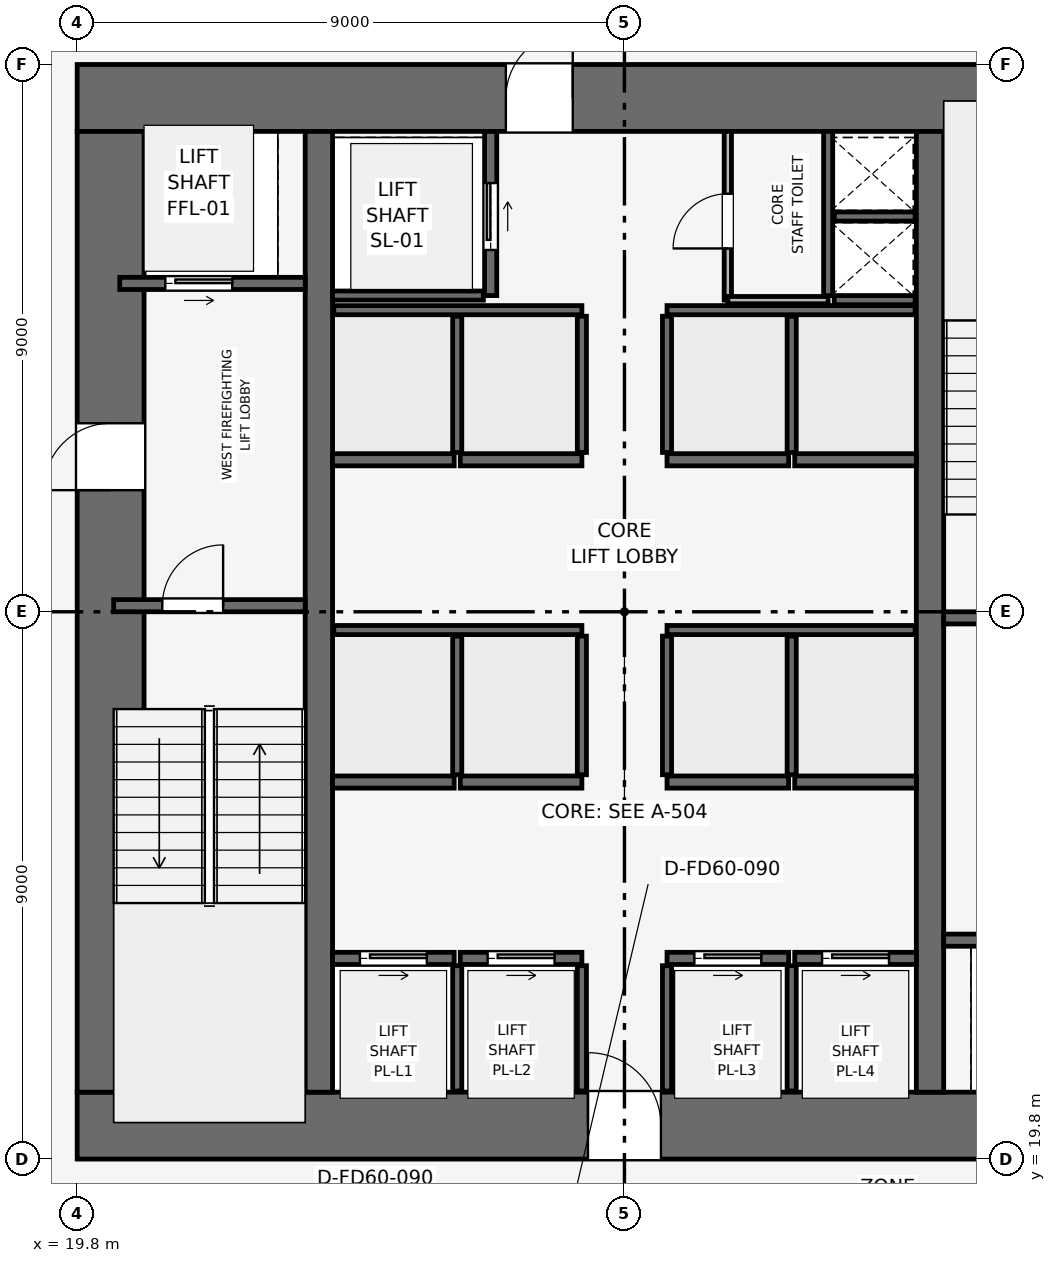
"""IFC4 building model, lengths in metres.
Left out: names, types, materials, properties, quantities, classifications, styles, units other than length and angle.
Written with IfcOpenShell. Run it as: python <this file> out.ifc"""

import sys

from ifc_helpers import new_model, si_unit, direction, frame, frame_2d, origin, place, context, subcontext, project, spatial, rectangle, extrude, element, fill, save


model = new_model("IFC4")
c1 = context("Model", 3, precision=1e-05, world=origin(), true_north=direction((0.0, 1.0)))
c2 = subcontext(c1, "Body", "Model", "MODEL_VIEW")
j1 = project(units=[si_unit("LENGTHUNIT", "METRE"), si_unit("PLANEANGLEUNIT", "RADIAN")], contexts=[c1])
p1 = place(None, origin())
s1 = spatial("IfcSite", under=j1, at=p1, CompositionType="ELEMENT")
p2 = place(p1, origin())
s2 = spatial("IfcBuilding", under=s1, at=p2, CompositionType="ELEMENT")
p3 = place(p2, frame((0.0, 0.0, 53.4)))
s3 = spatial("IfcBuildingStorey", under=s2, at=p3, CompositionType="ELEMENT", Elevation=53.4)
p4 = place(p3, frame((19.8, 20.35, 0.0), z_axis=(0.0, 0.0, 1.0), x_axis=(1.0, 0.0, 0.0)))
e1 = element("IfcWall", 1, at=p4, inside=s3, PredefinedType="SHEAR", context=c2, shape_type="SweptSolid", body=[
    extrude(rectangle(XDim=18.0, YDim=1.1, at=frame_2d((9.0, 0.0))), origin(), (0.0, 0.0, 1.0), 3.9),
])
p5 = place(p4, frame((8.4, 0.0, 0.0)))
e2 = element("IfcOpeningElement", 2, at=p5, cuts=e1, PredefinedType="OPENING", context=c2, shape_type="SweptSolid", body=[
    extrude(rectangle(XDim=1.2, YDim=2.2, at=frame_2d((0.6, 1.1))), frame((0.0, 0.56, 0.0), z_axis=(0.0, -1.0, 0.0), x_axis=(1.0, 0.0, 0.0)), (0.0, 0.0, 1.0), 1.12),
])
p6 = place(p3, frame((19.8, 37.25, 0.0), z_axis=(0.0, 0.0, 1.0), x_axis=(1.0, 0.0, 0.0)))
e3 = element("IfcWall", 3, at=p6, inside=s3, PredefinedType="SHEAR", context=c2, shape_type="SweptSolid", body=[
    extrude(rectangle(XDim=18.0, YDim=1.1, at=frame_2d((9.0, 0.0))), origin(), (0.0, 0.0, 1.0), 3.9),
])
p7 = place(p6, frame((7.05, 0.0, 0.0)))
e4 = element("IfcOpeningElement", 4, at=p7, cuts=e3, PredefinedType="OPENING", context=c2, shape_type="SweptSolid", body=[
    extrude(rectangle(XDim=1.1, YDim=2.15, at=frame_2d((0.55, 1.075))), frame((0.0, 0.56, 0.0), z_axis=(0.0, -1.0, 0.0), x_axis=(1.0, 0.0, 0.0)), (0.0, 0.0, 1.0), 1.12),
])
p8 = place(p3, frame((20.35, 20.9, 0.0), z_axis=(0.0, 0.0, 1.0), x_axis=(0.0, 1.0, 0.0)))
e5 = element("IfcWall", 5, at=p8, inside=s3, PredefinedType="SHEAR", context=c2, shape_type="SweptSolid", body=[
    extrude(rectangle(XDim=15.8, YDim=1.1, at=frame_2d((7.9, 0.0))), origin(), (0.0, 0.0, 1.0), 3.9),
])
p9 = place(p8, frame((9.9, 0.0, 0.0)))
e6 = element("IfcOpeningElement", 6, at=p9, cuts=e5, PredefinedType="OPENING", context=c2, shape_type="SweptSolid", body=[
    extrude(rectangle(XDim=1.1, YDim=2.15, at=frame_2d((0.55, 1.075))), frame((0.0, 0.56, 0.0), z_axis=(0.0, -1.0, 0.0), x_axis=(1.0, 0.0, 0.0)), (0.0, 0.0, 1.0), 1.12),
])
for number, where, z_axis, x_axis in (
    (7, (23.775, 20.9, 0.0), (0.0, 0.0, 1.0), (0.0, 1.0, 0.0)),
    (8, (33.825, 20.9, 0.0), (0.0, 0.0, 1.0), (0.0, 1.0, 0.0)),
):
    element("IfcWall", number, at=place(p3, frame(where, z_axis=z_axis, x_axis=x_axis)), inside=s3, PredefinedType="SHEAR", context=c2, shape_type="SweptSolid", body=[
        extrude(rectangle(XDim=15.8, YDim=0.45, at=frame_2d((7.9, 0.0))), origin(), (0.0, 0.0, 1.0), 3.9),
    ])
p10 = place(p3, frame((20.4, 28.9, 0.0), z_axis=(0.0, 0.0, 1.0), x_axis=(1.0, 0.0, 0.0)))
e9 = element("IfcWall", 9, at=p10, inside=s3, PredefinedType="SHEAR", context=c2, shape_type="SweptSolid", body=[
    extrude(rectangle(XDim=3.15, YDim=0.2, at=frame_2d((1.575, 0.0))), origin(), (0.0, 0.0, 1.0), 3.65),
])
p11 = place(p10, frame((0.8, 0.0, 0.0)))
e10 = element("IfcOpeningElement", 10, at=p11, cuts=e9, PredefinedType="OPENING", context=c2, shape_type="SweptSolid", body=[
    extrude(rectangle(XDim=1.0, YDim=2.1, at=frame_2d((0.5, 1.05))), frame((0.0, 0.11, 0.0), z_axis=(0.0, -1.0, 0.0), x_axis=(1.0, 0.0, 0.0)), (0.0, 0.0, 1.0), 0.22),
])
p12 = place(p3, frame((34.05, 28.7, 0.0), z_axis=(0.0, 0.0, 1.0), x_axis=(1.0, 0.0, 0.0)))
e11 = element("IfcWall", 11, at=p12, inside=s3, PredefinedType="SHEAR", context=c2, shape_type="SweptSolid", body=[
    extrude(rectangle(XDim=3.15, YDim=0.2, at=frame_2d((1.575, 0.0))), origin(), (0.0, 0.0, 1.0), 3.65),
])
p13 = place(p12, frame((0.8, 0.0, 0.0)))
e12 = element("IfcOpeningElement", 12, at=p13, cuts=e11, PredefinedType="OPENING", context=c2, shape_type="SweptSolid", body=[
    extrude(rectangle(XDim=1.0, YDim=2.1, at=frame_2d((0.5, 1.05))), frame((0.0, 0.11, 0.0), z_axis=(0.0, -1.0, 0.0), x_axis=(1.0, 0.0, 0.0)), (0.0, 0.0, 1.0), 0.22),
])
p14 = place(p3, frame((32.15, 34.0, 0.0), z_axis=(0.0, 0.0, 1.0), x_axis=(0.0, 1.0, 0.0)))
e13 = element("IfcWall", 13, at=p14, inside=s3, PredefinedType="SHEAR", context=c2, shape_type="SweptSolid", body=[
    extrude(rectangle(XDim=2.7, YDim=0.15, at=frame_2d((1.35, 0.0))), origin(), (0.0, 0.0, 1.0), 3.65),
])
for number, where, z_axis, x_axis in (
    (14, (32.25, 33.925, 0.0), (0.0, 0.0, 1.0), (1.0, 0.0, 0.0)),
    (15, (32.25, 35.3, 0.0), (0.0, 0.0, 1.0), (1.0, 0.0, 0.0)),
):
    element("IfcWall", number, at=place(p3, frame(where, z_axis=z_axis, x_axis=x_axis)), inside=s3, PredefinedType="SHEAR", context=c2, shape_type="SweptSolid", body=[
        extrude(rectangle(XDim=1.33, YDim=0.15, at=frame_2d((0.665, 0.0))), origin(), (0.0, 0.0, 1.0), 3.65),
    ])
p15 = place(p3, frame((20.5, 34.2, 0.0), z_axis=(0.0, 0.0, 1.0), x_axis=(1.0, 0.0, 0.0)))
e16 = element("IfcWall", 16, at=p15, inside=s3, PredefinedType="SHEAR", context=c2, shape_type="SweptSolid", body=[
    extrude(rectangle(XDim=3.05, YDim=0.2, at=frame_2d((1.525, 0.0))), origin(), (0.0, 0.0, 1.0), 3.65),
])
p16 = place(p15, frame((0.75, 0.0, 0.0)))
e17 = element("IfcOpeningElement", 17, at=p16, cuts=e16, PredefinedType="OPENING", context=c2, shape_type="SweptSolid", body=[
    extrude(rectangle(XDim=1.1, YDim=2.15, at=frame_2d((0.55, 1.075))), frame((0.0, 0.11, 0.0), z_axis=(0.0, -1.0, 0.0), x_axis=(1.0, 0.0, 0.0)), (0.0, 0.0, 1.0), 0.22),
])
p17 = place(p3, frame((34.05, 23.4, 0.0), z_axis=(0.0, 0.0, 1.0), x_axis=(1.0, 0.0, 0.0)))
e18 = element("IfcWall", 18, at=p17, inside=s3, PredefinedType="SHEAR", context=c2, shape_type="SweptSolid", body=[
    extrude(rectangle(XDim=3.05, YDim=0.2, at=frame_2d((1.525, 0.0))), origin(), (0.0, 0.0, 1.0), 3.65),
])
p18 = place(p17, frame((1.2, 0.0, 0.0)))
e19 = element("IfcOpeningElement", 19, at=p18, cuts=e18, PredefinedType="OPENING", context=c2, shape_type="SweptSolid", body=[
    extrude(rectangle(XDim=1.1, YDim=2.15, at=frame_2d((0.55, 1.075))), frame((0.0, 0.11, 0.0), z_axis=(0.0, -1.0, 0.0), x_axis=(1.0, 0.0, 0.0)), (0.0, 0.0, 1.0), 0.22),
])
p19 = place(p3, frame((26.6, 34.0, 0.0), z_axis=(0.0, 0.0, 1.0), x_axis=(0.0, 1.0, 0.0)))
e20 = element("IfcWall", 20, at=p19, inside=s3, PredefinedType="SHEAR", context=c2, shape_type="SweptSolid", body=[
    extrude(rectangle(XDim=2.7, YDim=0.2, at=frame_2d((1.35, 0.0))), origin(), (0.0, 0.0, 1.0), 3.65),
])
p20 = place(p19, frame((0.75, 0.0, 0.0)))
e21 = element("IfcOpeningElement", 21, at=p20, cuts=e20, PredefinedType="OPENING", context=c2, shape_type="SweptSolid", body=[
    extrude(rectangle(XDim=1.1, YDim=2.15, at=frame_2d((0.55, 1.075))), frame((0.0, 0.11, 0.0), z_axis=(0.0, -1.0, 0.0), x_axis=(1.0, 0.0, 0.0)), (0.0, 0.0, 1.0), 0.22),
])
p21 = place(p3, frame((24.0, 34.0, 0.0), z_axis=(0.0, 0.0, 1.0), x_axis=(1.0, 0.0, 0.0)))
e22 = element("IfcWall", 22, at=p21, inside=s3, PredefinedType="SHEAR", context=c2, shape_type="SweptSolid", body=[
    extrude(rectangle(XDim=2.48, YDim=0.15, at=frame_2d((1.24, 0.0))), origin(), (0.0, 0.0, 1.0), 3.65),
])
p22 = place(p3, frame((24.0, 23.1, 0.0), z_axis=(0.0, 0.0, 1.0), x_axis=(1.0, 0.0, 0.0)))
e23 = element("IfcWall", 23, at=p22, inside=s3, PredefinedType="SHEAR", context=c2, shape_type="SweptSolid", body=[
    extrude(rectangle(XDim=2.0, YDim=0.2, at=frame_2d((1.0, 0.0))), origin(), (0.0, 0.0, 1.0), 3.65),
])
p23 = place(p22, frame((0.45, 0.0, 0.0)))
e24 = element("IfcOpeningElement", 24, at=p23, cuts=e23, PredefinedType="OPENING", context=c2, shape_type="SweptSolid", body=[
    extrude(rectangle(XDim=1.1, YDim=2.15, at=frame_2d((0.55, 1.075))), frame((0.0, 0.11, 0.0), z_axis=(0.0, -1.0, 0.0), x_axis=(1.0, 0.0, 0.0)), (0.0, 0.0, 1.0), 0.22),
])
p24 = place(p3, frame((26.1, 23.1, 0.0), z_axis=(0.0, 0.0, 1.0), x_axis=(1.0, 0.0, 0.0)))
e25 = element("IfcWall", 25, at=p24, inside=s3, PredefinedType="SHEAR", context=c2, shape_type="SweptSolid", body=[
    extrude(rectangle(XDim=2.0, YDim=0.2, at=frame_2d((1.0, 0.0))), origin(), (0.0, 0.0, 1.0), 3.65),
])
p25 = place(p24, frame((0.45, 0.0, 0.0)))
e26 = element("IfcOpeningElement", 26, at=p25, cuts=e25, PredefinedType="OPENING", context=c2, shape_type="SweptSolid", body=[
    extrude(rectangle(XDim=1.1, YDim=2.15, at=frame_2d((0.55, 1.075))), frame((0.0, 0.11, 0.0), z_axis=(0.0, -1.0, 0.0), x_axis=(1.0, 0.0, 0.0)), (0.0, 0.0, 1.0), 0.22),
])
p26 = place(p3, frame((29.5, 23.1, 0.0), z_axis=(0.0, 0.0, 1.0), x_axis=(1.0, 0.0, 0.0)))
e27 = element("IfcWall", 27, at=p26, inside=s3, PredefinedType="SHEAR", context=c2, shape_type="SweptSolid", body=[
    extrude(rectangle(XDim=2.0, YDim=0.2, at=frame_2d((1.0, 0.0))), origin(), (0.0, 0.0, 1.0), 3.65),
])
p27 = place(p26, frame((0.45, 0.0, 0.0)))
e28 = element("IfcOpeningElement", 28, at=p27, cuts=e27, PredefinedType="OPENING", context=c2, shape_type="SweptSolid", body=[
    extrude(rectangle(XDim=1.1, YDim=2.15, at=frame_2d((0.55, 1.075))), frame((0.0, 0.11, 0.0), z_axis=(0.0, -1.0, 0.0), x_axis=(1.0, 0.0, 0.0)), (0.0, 0.0, 1.0), 0.22),
])
p28 = place(p3, frame((31.6, 23.1, 0.0), z_axis=(0.0, 0.0, 1.0), x_axis=(1.0, 0.0, 0.0)))
e29 = element("IfcWall", 29, at=p28, inside=s3, PredefinedType="SHEAR", context=c2, shape_type="SweptSolid", body=[
    extrude(rectangle(XDim=2.0, YDim=0.2, at=frame_2d((1.0, 0.0))), origin(), (0.0, 0.0, 1.0), 3.65),
])
p29 = place(p28, frame((0.45, 0.0, 0.0)))
e30 = element("IfcOpeningElement", 30, at=p29, cuts=e29, PredefinedType="OPENING", context=c2, shape_type="SweptSolid", body=[
    extrude(rectangle(XDim=1.1, YDim=2.15, at=frame_2d((0.55, 1.075))), frame((0.0, 0.11, 0.0), z_axis=(0.0, -1.0, 0.0), x_axis=(1.0, 0.0, 0.0)), (0.0, 0.0, 1.0), 0.22),
])
for number, where, z_axis, x_axis in (
    (31, (24.0, 26.0, 0.0), (0.0, 0.0, 1.0), (1.0, 0.0, 0.0)),
    (32, (26.1, 26.0, 0.0), (0.0, 0.0, 1.0), (1.0, 0.0, 0.0)),
    (33, (29.5, 26.0, 0.0), (0.0, 0.0, 1.0), (1.0, 0.0, 0.0)),
    (34, (31.6, 26.0, 0.0), (0.0, 0.0, 1.0), (1.0, 0.0, 0.0)),
    (35, (24.0, 31.3, 0.0), (0.0, 0.0, 1.0), (1.0, 0.0, 0.0)),
    (36, (26.1, 31.3, 0.0), (0.0, 0.0, 1.0), (1.0, 0.0, 0.0)),
    (37, (29.5, 31.3, 0.0), (0.0, 0.0, 1.0), (1.0, 0.0, 0.0)),
    (38, (31.6, 31.3, 0.0), (0.0, 0.0, 1.0), (1.0, 0.0, 0.0)),
):
    element("IfcWall", number, at=place(p3, frame(where, z_axis=z_axis, x_axis=x_axis)), inside=s3, PredefinedType="SHEAR", context=c2, shape_type="SweptSolid", body=[
        extrude(rectangle(XDim=2.0, YDim=0.2, at=frame_2d((1.0, 0.0))), origin(), (0.0, 0.0, 1.0), 3.65),
    ])
for number, where, z_axis, x_axis in (
    (39, (26.05, 20.92, 0.0), (0.0, 0.0, 1.0), (0.0, 1.0, 0.0)),
    (40, (28.1, 20.92, 0.0), (0.0, 0.0, 1.0), (0.0, 1.0, 0.0)),
    (41, (29.5, 20.92, 0.0), (0.0, 0.0, 1.0), (0.0, 1.0, 0.0)),
    (42, (31.55, 20.92, 0.0), (0.0, 0.0, 1.0), (0.0, 1.0, 0.0)),
):
    element("IfcWall", number, at=place(p3, frame(where, z_axis=z_axis, x_axis=x_axis)), inside=s3, PredefinedType="SHEAR", context=c2, shape_type="SweptSolid", body=[
        extrude(rectangle(XDim=2.06, YDim=0.15, at=frame_2d((1.03, 0.0))), origin(), (0.0, 0.0, 1.0), 3.65),
    ])
for number, where, z_axis, x_axis in (
    (43, (24.02, 28.5, 0.0), (0.0, 0.0, 1.0), (1.0, 0.0, 0.0)),
    (44, (29.5, 28.5, 0.0), (0.0, 0.0, 1.0), (1.0, 0.0, 0.0)),
):
    element("IfcWall", number, at=place(p3, frame(where, z_axis=z_axis, x_axis=x_axis)), inside=s3, PredefinedType="SHEAR", context=c2, shape_type="SweptSolid", body=[
        extrude(rectangle(XDim=4.08, YDim=0.15, at=frame_2d((2.04, 0.0))), origin(), (0.0, 0.0, 1.0), 3.65),
    ])
for number, where, z_axis, x_axis in (
    (45, (26.05, 26.12, 0.0), (0.0, 0.0, 1.0), (0.0, 1.0, 0.0)),
    (46, (28.1, 26.12, 0.0), (0.0, 0.0, 1.0), (0.0, 1.0, 0.0)),
    (47, (29.5, 26.12, 0.0), (0.0, 0.0, 1.0), (0.0, 1.0, 0.0)),
    (48, (31.55, 26.12, 0.0), (0.0, 0.0, 1.0), (0.0, 1.0, 0.0)),
):
    element("IfcWall", number, at=place(p3, frame(where, z_axis=z_axis, x_axis=x_axis)), inside=s3, PredefinedType="SHEAR", context=c2, shape_type="SweptSolid", body=[
        extrude(rectangle(XDim=2.28, YDim=0.15, at=frame_2d((1.14, 0.0))), origin(), (0.0, 0.0, 1.0), 3.65),
    ])
for number, where, z_axis, x_axis in (
    (49, (24.02, 33.76, 0.0), (0.0, 0.0, 1.0), (1.0, 0.0, 0.0)),
    (50, (29.5, 33.76, 0.0), (0.0, 0.0, 1.0), (1.0, 0.0, 0.0)),
):
    element("IfcWall", number, at=place(p3, frame(where, z_axis=z_axis, x_axis=x_axis)), inside=s3, PredefinedType="SHEAR", context=c2, shape_type="SweptSolid", body=[
        extrude(rectangle(XDim=4.08, YDim=0.15, at=frame_2d((2.04, 0.0))), origin(), (0.0, 0.0, 1.0), 3.65),
    ])
for number, where, z_axis, x_axis in (
    (51, (26.05, 31.42, 0.0), (0.0, 0.0, 1.0), (0.0, 1.0, 0.0)),
    (52, (28.1, 31.42, 0.0), (0.0, 0.0, 1.0), (0.0, 1.0, 0.0)),
    (53, (29.5, 31.42, 0.0), (0.0, 0.0, 1.0), (0.0, 1.0, 0.0)),
    (54, (31.55, 31.42, 0.0), (0.0, 0.0, 1.0), (0.0, 1.0, 0.0)),
):
    element("IfcWall", number, at=place(p3, frame(where, z_axis=z_axis, x_axis=x_axis)), inside=s3, PredefinedType="SHEAR", context=c2, shape_type="SweptSolid", body=[
        extrude(rectangle(XDim=2.24, YDim=0.15, at=frame_2d((1.12, 0.0))), origin(), (0.0, 0.0, 1.0), 3.65),
    ])
p30 = place(p3, frame((30.5, 33.925, 0.0), z_axis=(0.0, 0.0, 1.0), x_axis=(0.0, 1.0, 0.0)))
e55 = element("IfcWall", 55, at=p30, inside=s3, PredefinedType="PARTITIONING", context=c2, shape_type="SweptSolid", body=[
    extrude(rectangle(XDim=2.775, YDim=0.12, at=frame_2d((1.387, 0.0))), origin(), (0.0, 0.0, 1.0), 3.65),
])
p31 = place(p30, frame((0.85, 0.0, 0.0)))
e56 = element("IfcOpeningElement", 56, at=p31, cuts=e55, PredefinedType="OPENING", context=c2, shape_type="SweptSolid", body=[
    extrude(rectangle(XDim=0.9, YDim=2.1, at=frame_2d((0.45, 1.05))), frame((0.0, 0.07, 0.0), z_axis=(0.0, -1.0, 0.0), x_axis=(1.0, 0.0, 0.0)), (0.0, 0.0, 1.0), 0.14),
])
p32 = place(p3, frame((30.5, 33.925, 0.0), z_axis=(0.0, 0.0, 1.0), x_axis=(1.0, 0.0, 0.0)))
e57 = element("IfcWall", 57, at=p32, inside=s3, PredefinedType="PARTITIONING", context=c2, shape_type="SweptSolid", body=[
    extrude(rectangle(XDim=1.65, YDim=0.12, at=frame_2d((0.825, 0.0))), origin(), (0.0, 0.0, 1.0), 3.65),
])
p33 = place(p11, origin())
e58 = element("IfcDoor", 58, at=p33, inside=s3, OperationType="SINGLE_SWING_RIGHT", PredefinedType="DOOR", context=c2, shape_type="SweptSolid", body=[
    extrude(rectangle(XDim=1.0, YDim=2.1, at=frame_2d((0.5, 1.05))), frame((0.0, 0.025, 0.0), z_axis=(0.0, -1.0, 0.0), x_axis=(1.0, 0.0, 0.0)), (0.0, 0.0, 1.0), 0.05),
])
fill(e10, e58)
p34 = place(p16, origin())
e59 = element("IfcDoor", 59, at=p34, inside=s3, OperationType="SLIDING_TO_RIGHT", PredefinedType="DOOR", context=c2, shape_type="SweptSolid", body=[
    extrude(rectangle(XDim=1.1, YDim=2.15, at=frame_2d((0.55, 1.075))), frame((0.0, 0.025, 0.0), z_axis=(0.0, -1.0, 0.0), x_axis=(1.0, 0.0, 0.0)), (0.0, 0.0, 1.0), 0.05),
])
fill(e17, e59)
p35 = place(p20, origin())
e60 = element("IfcDoor", 60, at=p35, inside=s3, OperationType="SLIDING_TO_RIGHT", PredefinedType="DOOR", context=c2, shape_type="SweptSolid", body=[
    extrude(rectangle(XDim=1.1, YDim=2.15, at=frame_2d((0.55, 1.075))), frame((0.0, 0.025, 0.0), z_axis=(0.0, -1.0, 0.0), x_axis=(1.0, 0.0, 0.0)), (0.0, 0.0, 1.0), 0.05),
])
fill(e21, e60)
p36 = place(p23, origin())
e61 = element("IfcDoor", 61, at=p36, inside=s3, OperationType="SLIDING_TO_RIGHT", PredefinedType="DOOR", context=c2, shape_type="SweptSolid", body=[
    extrude(rectangle(XDim=1.1, YDim=2.15, at=frame_2d((0.55, 1.075))), frame((0.0, 0.025, 0.0), z_axis=(0.0, -1.0, 0.0), x_axis=(1.0, 0.0, 0.0)), (0.0, 0.0, 1.0), 0.05),
])
fill(e24, e61)
p37 = place(p25, origin())
e62 = element("IfcDoor", 62, at=p37, inside=s3, OperationType="SLIDING_TO_RIGHT", PredefinedType="DOOR", context=c2, shape_type="SweptSolid", body=[
    extrude(rectangle(XDim=1.1, YDim=2.15, at=frame_2d((0.55, 1.075))), frame((0.0, 0.025, 0.0), z_axis=(0.0, -1.0, 0.0), x_axis=(1.0, 0.0, 0.0)), (0.0, 0.0, 1.0), 0.05),
])
fill(e26, e62)
p38 = place(p27, origin())
e63 = element("IfcDoor", 63, at=p38, inside=s3, OperationType="SLIDING_TO_RIGHT", PredefinedType="DOOR", context=c2, shape_type="SweptSolid", body=[
    extrude(rectangle(XDim=1.1, YDim=2.15, at=frame_2d((0.55, 1.075))), frame((0.0, 0.025, 0.0), z_axis=(0.0, -1.0, 0.0), x_axis=(1.0, 0.0, 0.0)), (0.0, 0.0, 1.0), 0.05),
])
fill(e28, e63)
p39 = place(p29, origin())
e64 = element("IfcDoor", 64, at=p39, inside=s3, OperationType="SLIDING_TO_RIGHT", PredefinedType="DOOR", context=c2, shape_type="SweptSolid", body=[
    extrude(rectangle(XDim=1.1, YDim=2.15, at=frame_2d((0.55, 1.075))), frame((0.0, 0.025, 0.0), z_axis=(0.0, -1.0, 0.0), x_axis=(1.0, 0.0, 0.0)), (0.0, 0.0, 1.0), 0.05),
])
fill(e30, e64)
p40 = place(p31, origin())
e65 = element("IfcDoor", 65, at=p40, inside=s3, OperationType="SINGLE_SWING_LEFT", PredefinedType="DOOR", context=c2, shape_type="SweptSolid", body=[
    extrude(rectangle(XDim=0.9, YDim=2.1, at=frame_2d((0.45, 1.05))), frame((0.0, 0.025, 0.0), z_axis=(0.0, -1.0, 0.0), x_axis=(1.0, 0.0, 0.0)), (0.0, 0.0, 1.0), 0.05),
])
fill(e56, e65)
p41 = place(p9, origin())
e66 = element("IfcDoor", 66, at=p41, inside=s3, OperationType="SINGLE_SWING_LEFT", PredefinedType="DOOR", context=c2, shape_type="SweptSolid", body=[
    extrude(rectangle(XDim=1.1, YDim=2.15, at=frame_2d((0.55, 1.075))), frame((0.0, 0.025, 0.0), z_axis=(0.0, -1.0, 0.0), x_axis=(1.0, 0.0, 0.0)), (0.0, 0.0, 1.0), 0.05),
])
fill(e6, e66)
p42 = place(p5, origin())
e67 = element("IfcDoor", 67, at=p42, inside=s3, OperationType="SINGLE_SWING_LEFT", PredefinedType="DOOR", context=c2, shape_type="SweptSolid", body=[
    extrude(rectangle(XDim=1.2, YDim=2.2, at=frame_2d((0.6, 1.1))), frame((0.0, 0.025, 0.0), z_axis=(0.0, -1.0, 0.0), x_axis=(1.0, 0.0, 0.0)), (0.0, 0.0, 1.0), 0.05),
])
fill(e2, e67)
p43 = place(p7, origin())
e68 = element("IfcDoor", 68, at=p43, inside=s3, OperationType="SINGLE_SWING_RIGHT", PredefinedType="DOOR", context=c2, shape_type="SweptSolid", body=[
    extrude(rectangle(XDim=1.1, YDim=2.15, at=frame_2d((0.55, 1.075))), frame((0.0, 0.025, 0.0), z_axis=(0.0, -1.0, 0.0), x_axis=(1.0, 0.0, 0.0)), (0.0, 0.0, 1.0), 0.05),
])
fill(e4, e68)
save(model, sys.argv[1])
